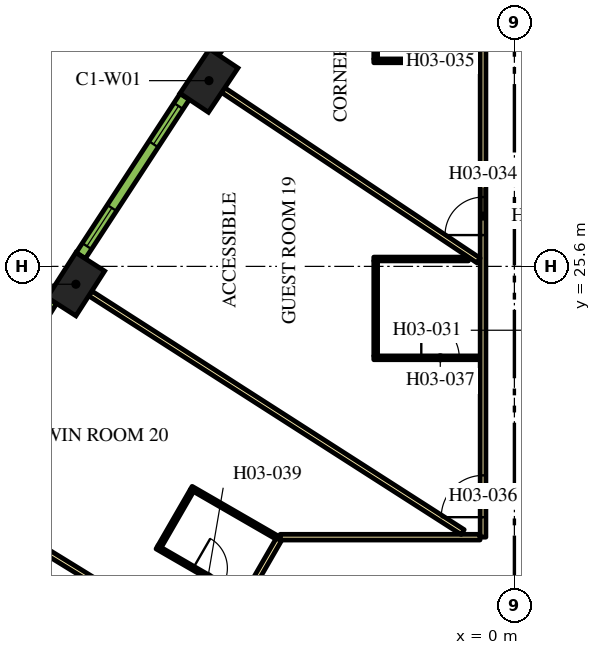
"""IFC4 building model, lengths in metres.
Left out: names, types, materials, properties, quantities, classifications, styles, units other than length and angle.
Written with IfcOpenShell. Run it as: python <this file> out.ifc"""

import sys

from ifc_helpers import new_model, si_unit, direction, frame, frame_2d, origin, origin_2d, place, context, subcontext, project, spatial, rectangle, extrude, element, fill, save


model = new_model("IFC4")
c1 = context("Model", 3, precision=1e-05, world=origin(), true_north=direction((0.0, 1.0)))
c2 = subcontext(c1, "Body", "Model", "MODEL_VIEW")
j1 = project(units=[si_unit("LENGTHUNIT", "METRE"), si_unit("PLANEANGLEUNIT", "RADIAN")], contexts=[c1])
p1 = place(None, origin())
s1 = spatial("IfcSite", under=j1, at=p1, CompositionType="ELEMENT")
p2 = place(p1, origin())
s2 = spatial("IfcBuilding", under=s1, at=p2, CompositionType="ELEMENT")
p3 = place(p2, frame((0.0, 0.0, 54.9)))
s3 = spatial("IfcBuildingStorey", under=s2, at=p3, CompositionType="ELEMENT", Elevation=54.9)
for number, where, z_axis, x_axis in (
    (1, (-8.037, 30.487, 0.0), (0.0, 0.0, 1.0), (-0.555, -0.832, 0.0)),
    (2, (-11.539, 25.131, 0.0), (0.0, 0.0, 1.0), (-0.539, -0.842, 0.0)),
):
    element("IfcColumn", number, at=place(p3, frame(where, z_axis=z_axis, x_axis=x_axis)), inside=s3, PredefinedType="COLUMN", context=c2, shape_type="SweptSolid", body=[
        extrude(rectangle(XDim=1.4, YDim=0.9, at=origin_2d()), origin(), (0.0, 0.0, 1.0), 3.9),
    ])
p4 = place(p3, frame((-0.825, 18.475, 0.0), z_axis=(0.0, 0.0, 1.0), x_axis=(0.0, 1.0, 0.0)))
e3 = element("IfcWall", 3, at=p4, inside=s3, PredefinedType="PARTITIONING", context=c2, shape_type="SweptSolid", body=[
    extrude(rectangle(XDim=16.224, YDim=0.15, at=frame_2d((8.112, 0.0))), origin(), (0.0, 0.0, 1.0), 2.75),
])
p5 = place(p4, frame((7.949, 0.0, 0.0)))
e4 = element("IfcOpeningElement", 4, at=p5, cuts=e3, PredefinedType="OPENING", context=c2, shape_type="SweptSolid", body=[
    extrude(rectangle(XDim=1.0, YDim=2.1, at=frame_2d((0.5, 1.05))), frame((0.0, 0.085, 0.0), z_axis=(0.0, -1.0, 0.0), x_axis=(1.0, 0.0, 0.0)), (0.0, 0.0, 1.0), 0.17),
])
p6 = place(p4, frame((0.526, 0.0, 0.0)))
e5 = element("IfcOpeningElement", 5, at=p6, cuts=e3, PredefinedType="OPENING", context=c2, shape_type="SweptSolid", body=[
    extrude(rectangle(XDim=1.1, YDim=2.1, at=frame_2d((0.55, 1.05))), frame((0.0, 0.085, 0.0), z_axis=(0.0, -1.0, 0.0), x_axis=(1.0, 0.0, 0.0)), (0.0, 0.0, 1.0), 0.17),
])
p7 = place(p3, frame((-6.163, 18.475, 0.0), z_axis=(0.0, 0.0, 1.0), x_axis=(1.0, 0.0, 0.0)))
e6 = element("IfcWall", 6, at=p7, inside=s3, PredefinedType="PARTITIONING", context=c2, shape_type="SweptSolid", body=[
    extrude(rectangle(XDim=5.258, YDim=0.15, at=frame_2d((2.629, 0.0))), origin(), (0.0, 0.0, 1.0), 2.75),
])
p8 = place(p3, frame((-19.081, -3.9, 0.0), z_axis=(0.0, 0.0, 1.0), x_axis=(0.499998313975, 0.866026377209, 0.0)))
e7 = element("IfcWall", 7, at=p8, inside=s3, PredefinedType="PARTITIONING", context=c2, shape_type="SweptSolid", body=[
    extrude(rectangle(XDim=25.766, YDim=0.15, at=frame_2d((12.883, 0.0))), origin(), (0.0, 0.0, 1.0), 2.75),
])
p9 = place(p8, frame((22.445, 0.0, 0.0)))
e8 = element("IfcOpeningElement", 8, at=p9, cuts=e7, PredefinedType="OPENING", context=c2, shape_type="SweptSolid", body=[
    extrude(rectangle(XDim=1.0, YDim=2.1, at=frame_2d((0.5, 1.05))), frame((0.0, 0.085, 0.0), z_axis=(0.0, -1.0, 0.0), x_axis=(1.0, 0.0, 0.0)), (0.0, 0.0, 1.0), 0.17),
])
p10 = place(p8, frame((21.138, 0.0, 0.0)))
e9 = element("IfcOpeningElement", 9, at=p10, cuts=e7, PredefinedType="OPENING", context=c2, shape_type="SweptSolid", body=[
    extrude(rectangle(XDim=1.0, YDim=2.1, at=frame_2d((0.5, 1.05))), frame((0.0, 0.085, 0.0), z_axis=(0.0, -1.0, 0.0), x_axis=(1.0, 0.0, 0.0)), (0.0, 0.0, 1.0), 0.17),
])
p11 = place(p8, frame((14.066, 0.0, 0.0)))
e10 = element("IfcOpeningElement", 10, at=p11, cuts=e7, PredefinedType="OPENING", context=c2, shape_type="SweptSolid", body=[
    extrude(rectangle(XDim=0.9, YDim=2.1, at=frame_2d((0.45, 1.05))), frame((0.0, 0.085, 0.0), z_axis=(0.0, -1.0, 0.0), x_axis=(1.0, 0.0, 0.0)), (0.0, 0.0, 1.0), 0.17),
])
p12 = place(p8, frame((11.693, 0.0, 0.0)))
e11 = element("IfcOpeningElement", 11, at=p12, cuts=e7, PredefinedType="OPENING", context=c2, shape_type="SweptSolid", body=[
    extrude(rectangle(XDim=1.0, YDim=2.1, at=frame_2d((0.5, 1.05))), frame((0.0, 0.085, 0.0), z_axis=(0.0, -1.0, 0.0), x_axis=(1.0, 0.0, 0.0)), (0.0, 0.0, 1.0), 0.17),
])
p13 = place(p3, frame((-14.558, 19.475, 0.0), z_axis=(0.0, 0.0, 1.0), x_axis=(0.851829455142, -0.523819223925, 0.0)))
e12 = element("IfcWall", 12, at=p13, inside=s3, PredefinedType="PARTITIONING", context=c2, shape_type="SweptSolid", body=[
    extrude(rectangle(XDim=7.688, YDim=0.15, at=frame_2d((3.844, 0.0))), origin(), (0.0, 0.0, 1.0), 2.75),
])
p14 = place(p3, frame((-11.16, 24.888, 0.0), z_axis=(0.0, 0.0, 1.0), x_axis=(0.84199813156, -0.539480441211, 0.0)))
e13 = element("IfcWall", 13, at=p14, inside=s3, PredefinedType="PARTITIONING", context=c2, shape_type="SweptSolid", body=[
    extrude(rectangle(XDim=11.638, YDim=0.15, at=frame_2d((5.819, 0.0))), origin(), (0.0, 0.0, 1.0), 2.75),
])
p15 = place(p3, frame((-7.662, 30.238, 0.0), z_axis=(0.0, 0.0, 1.0), x_axis=(0.831882886825, -0.554951225431, 0.0)))
e14 = element("IfcWall", 14, at=p15, inside=s3, PredefinedType="PARTITIONING", context=c2, shape_type="SweptSolid", body=[
    extrude(rectangle(XDim=8.079, YDim=0.15, at=frame_2d((4.04, 0.0))), origin(), (0.0, 0.0, 1.0), 2.75),
])
p16 = place(p3, frame((-3.7, 31.009, 0.0), z_axis=(0.0, 0.0, 1.0), x_axis=(1.0, 0.0, 0.0)))
e15 = element("IfcWall", 15, at=p16, inside=s3, PredefinedType="PARTITIONING", context=c2, shape_type="SweptSolid", body=[
    extrude(rectangle(XDim=2.8, YDim=0.1, at=frame_2d((1.4, 0.0))), origin(), (0.0, 0.0, 1.0), 2.75),
])
p17 = place(p16, frame((1.3, 0.0, 0.0)))
e16 = element("IfcOpeningElement", 16, at=p17, cuts=e15, PredefinedType="OPENING", context=c2, shape_type="SweptSolid", body=[
    extrude(rectangle(XDim=0.9, YDim=2.1, at=frame_2d((0.45, 1.05))), frame((0.0, 0.06, 0.0), z_axis=(0.0, -1.0, 0.0), x_axis=(1.0, 0.0, 0.0)), (0.0, 0.0, 1.0), 0.12),
])
p18 = place(p3, frame((-3.65, 31.059, 0.0), z_axis=(0.0, 0.0, 1.0), x_axis=(0.0, 1.0, 0.0)))
e17 = element("IfcWall", 17, at=p18, inside=s3, PredefinedType="PARTITIONING", context=c2, shape_type="SweptSolid", body=[
    extrude(rectangle(XDim=2.4, YDim=0.1, at=frame_2d((1.2, 0.0))), origin(), (0.0, 0.0, 1.0), 2.75),
])
p19 = place(p3, frame((-3.7, 23.195, 0.0), z_axis=(0.0, 0.0, 1.0), x_axis=(1.0, 0.0, 0.0)))
e18 = element("IfcWall", 18, at=p19, inside=s3, PredefinedType="PARTITIONING", context=c2, shape_type="SweptSolid", body=[
    extrude(rectangle(XDim=2.8, YDim=0.1, at=frame_2d((1.4, 0.0))), origin(), (0.0, 0.0, 1.0), 2.75),
])
p20 = place(p19, frame((1.25, 0.0, 0.0)))
e19 = element("IfcOpeningElement", 19, at=p20, cuts=e18, PredefinedType="OPENING", context=c2, shape_type="SweptSolid", body=[
    extrude(rectangle(XDim=1.0, YDim=2.1, at=frame_2d((0.5, 1.05))), frame((0.0, 0.06, 0.0), z_axis=(0.0, -1.0, 0.0), x_axis=(1.0, 0.0, 0.0)), (0.0, 0.0, 1.0), 0.12),
])
p21 = place(p3, frame((-3.65, 23.245, 0.0), z_axis=(0.0, 0.0, 1.0), x_axis=(0.0, 1.0, 0.0)))
e20 = element("IfcWall", 20, at=p21, inside=s3, PredefinedType="PARTITIONING", context=c2, shape_type="SweptSolid", body=[
    extrude(rectangle(XDim=2.5, YDim=0.1, at=frame_2d((1.25, 0.0))), origin(), (0.0, 0.0, 1.0), 2.75),
])
p22 = place(p3, frame((-1.21, 25.795, 0.0), z_axis=(0.0, 0.0, 1.0), x_axis=(-1.0, 0.0, 0.0)))
e21 = element("IfcWall", 21, at=p22, inside=s3, PredefinedType="PARTITIONING", context=c2, shape_type="SweptSolid", body=[
    extrude(rectangle(XDim=2.49, YDim=0.1, at=frame_2d((1.245, 0.0))), origin(), (0.0, 0.0, 1.0), 2.75),
])
p23 = place(p3, frame((-9.405, 18.21, 0.0), z_axis=(0.0, 0.0, 1.0), x_axis=(0.865997922154, -0.500047596559, 0.0)))
e22 = element("IfcWall", 22, at=p23, inside=s3, PredefinedType="PARTITIONING", context=c2, shape_type="SweptSolid", body=[
    extrude(rectangle(XDim=2.6, YDim=0.1, at=frame_2d((1.3, 0.0))), origin(), (0.0, 0.0, 1.0), 2.75),
])
p24 = place(p23, frame((1.1, 0.0, 0.0)))
e23 = element("IfcOpeningElement", 23, at=p24, cuts=e22, PredefinedType="OPENING", context=c2, shape_type="SweptSolid", body=[
    extrude(rectangle(XDim=0.9, YDim=2.1, at=frame_2d((0.45, 1.05))), frame((0.0, 0.06, 0.0), z_axis=(0.0, -1.0, 0.0), x_axis=(1.0, 0.0, 0.0)), (0.0, 0.0, 1.0), 0.12),
])
p25 = place(p3, frame((-9.336, 18.229, 0.0), z_axis=(0.0, 0.0, 1.0), x_axis=(0.499954529098, 0.86605165483, 0.0)))
e24 = element("IfcWall", 24, at=p25, inside=s3, PredefinedType="PARTITIONING", context=c2, shape_type="SweptSolid", body=[
    extrude(rectangle(XDim=1.7, YDim=0.1, at=frame_2d((0.85, 0.0))), origin(), (0.0, 0.0, 1.0), 2.75),
])
p26 = place(p3, frame((-6.253, 18.469, 0.0), z_axis=(0.0, 0.0, 1.0), x_axis=(-0.866021400173, 0.500006934395, 0.0)))
e25 = element("IfcWall", 25, at=p26, inside=s3, PredefinedType="PARTITIONING", context=c2, shape_type="SweptSolid", body=[
    extrude(rectangle(XDim=2.6, YDim=0.1, at=frame_2d((1.3, 0.0))), origin(), (0.0, 0.0, 1.0), 2.75),
])
p27 = place(p3, frame((-5.078, 35.376, 0.0), z_axis=(0.0, 0.0, 1.0), x_axis=(-0.562610153679, -0.826722332454, 0.0)))
e26 = element("IfcWall", 26, at=p27, inside=s3, PredefinedType="SOLIDWALL", context=c2, shape_type="SweptSolid", body=[
    extrude(rectangle(XDim=5.006, YDim=0.29, at=frame_2d((2.503, 0.0))), origin(), (0.0, 0.0, 1.0), 3.65),
])
p28 = place(p27, frame((0.265, 0.0, 0.9)))
e27 = element("IfcOpeningElement", 27, at=p28, cuts=e26, PredefinedType="OPENING", context=c2, shape_type="SweptSolid", body=[
    extrude(rectangle(XDim=1.2, YDim=2.15, at=frame_2d((0.6, 1.075))), frame((0.0, 0.155, 0.0), z_axis=(0.0, -1.0, 0.0), x_axis=(1.0, 0.0, 0.0)), (0.0, 0.0, 1.0), 0.31),
])
p29 = place(p27, frame((3.495, 0.0, 0.9)))
e28 = element("IfcOpeningElement", 28, at=p29, cuts=e26, PredefinedType="OPENING", context=c2, shape_type="SweptSolid", body=[
    extrude(rectangle(XDim=1.2, YDim=2.15, at=frame_2d((0.6, 1.075))), frame((0.0, 0.155, 0.0), z_axis=(0.0, -1.0, 0.0), x_axis=(1.0, 0.0, 0.0)), (0.0, 0.0, 1.0), 0.31),
])
p30 = place(p3, frame((-8.676, 30.068, 0.0), z_axis=(0.0, 0.0, 1.0), x_axis=(-0.547204617628, -0.836998868845, 0.0)))
e29 = element("IfcWall", 29, at=p30, inside=s3, PredefinedType="SOLIDWALL", context=c2, shape_type="SweptSolid", body=[
    extrude(rectangle(XDim=4.998, YDim=0.29, at=frame_2d((2.499, 0.0))), origin(), (0.0, 0.0, 1.0), 3.65),
])
p31 = place(p30, frame((0.297, 0.0, 0.9)))
e30 = element("IfcOpeningElement", 30, at=p31, cuts=e29, PredefinedType="OPENING", context=c2, shape_type="SweptSolid", body=[
    extrude(rectangle(XDim=1.2, YDim=2.15, at=frame_2d((0.6, 1.075))), frame((0.0, 0.155, 0.0), z_axis=(0.0, -1.0, 0.0), x_axis=(1.0, 0.0, 0.0)), (0.0, 0.0, 1.0), 0.31),
])
p32 = place(p30, frame((3.501, 0.0, 0.9)))
e31 = element("IfcOpeningElement", 31, at=p32, cuts=e29, PredefinedType="OPENING", context=c2, shape_type="SweptSolid", body=[
    extrude(rectangle(XDim=1.2, YDim=2.15, at=frame_2d((0.6, 1.075))), frame((0.0, 0.155, 0.0), z_axis=(0.0, -1.0, 0.0), x_axis=(1.0, 0.0, 0.0)), (0.0, 0.0, 1.0), 0.31),
])
p33 = place(p3, frame((-12.17, 24.699, 0.0), z_axis=(0.0, 0.0, 1.0), x_axis=(-0.531688286542, -0.846940119462, 0.0)))
e32 = element("IfcWall", 32, at=p33, inside=s3, PredefinedType="SOLIDWALL", context=c2, shape_type="SweptSolid", body=[
    extrude(rectangle(XDim=4.998, YDim=0.29, at=frame_2d((2.499, 0.0))), origin(), (0.0, 0.0, 1.0), 3.65),
])
p34 = place(p33, frame((0.297, 0.0, 0.9)))
e33 = element("IfcOpeningElement", 33, at=p34, cuts=e32, PredefinedType="OPENING", context=c2, shape_type="SweptSolid", body=[
    extrude(rectangle(XDim=1.2, YDim=2.15, at=frame_2d((0.6, 1.075))), frame((0.0, 0.155, 0.0), z_axis=(0.0, -1.0, 0.0), x_axis=(1.0, 0.0, 0.0)), (0.0, 0.0, 1.0), 0.31),
])
p35 = place(p33, frame((3.501, 0.0, 0.9)))
e34 = element("IfcOpeningElement", 34, at=p35, cuts=e32, PredefinedType="OPENING", context=c2, shape_type="SweptSolid", body=[
    extrude(rectangle(XDim=1.2, YDim=2.15, at=frame_2d((0.6, 1.075))), frame((0.0, 0.155, 0.0), z_axis=(0.0, -1.0, 0.0), x_axis=(1.0, 0.0, 0.0)), (0.0, 0.0, 1.0), 0.31),
])
p36 = place(p5, origin())
e35 = element("IfcDoor", 35, at=p36, inside=s3, OperationType="SINGLE_SWING_LEFT", PredefinedType="DOOR", context=c2, shape_type="SweptSolid", body=[
    extrude(rectangle(XDim=1.0, YDim=2.1, at=frame_2d((0.5, 1.05))), frame((0.0, 0.025, 0.0), z_axis=(0.0, -1.0, 0.0), x_axis=(1.0, 0.0, 0.0)), (0.0, 0.0, 1.0), 0.05),
])
fill(e4, e35)
p37 = place(p17, origin())
e36 = element("IfcDoor", 36, at=p37, inside=s3, OperationType="SINGLE_SWING_RIGHT", PredefinedType="DOOR", context=c2, shape_type="SweptSolid", body=[
    extrude(rectangle(XDim=0.9, YDim=2.1, at=frame_2d((0.45, 1.05))), frame((0.0, 0.025, 0.0), z_axis=(0.0, -1.0, 0.0), x_axis=(1.0, 0.0, 0.0)), (0.0, 0.0, 1.0), 0.05),
])
fill(e16, e36)
p38 = place(p6, origin())
e37 = element("IfcDoor", 37, at=p38, inside=s3, OperationType="SINGLE_SWING_LEFT", PredefinedType="DOOR", context=c2, shape_type="SweptSolid", body=[
    extrude(rectangle(XDim=1.1, YDim=2.1, at=frame_2d((0.55, 1.05))), frame((0.0, 0.025, 0.0), z_axis=(0.0, -1.0, 0.0), x_axis=(1.0, 0.0, 0.0)), (0.0, 0.0, 1.0), 0.05),
])
fill(e5, e37)
p39 = place(p20, origin())
e38 = element("IfcDoor", 38, at=p39, inside=s3, OperationType="SINGLE_SWING_LEFT", PredefinedType="DOOR", context=c2, shape_type="SweptSolid", body=[
    extrude(rectangle(XDim=1.0, YDim=2.1, at=frame_2d((0.5, 1.05))), frame((0.0, 0.025, 0.0), z_axis=(0.0, -1.0, 0.0), x_axis=(1.0, 0.0, 0.0)), (0.0, 0.0, 1.0), 0.05),
])
fill(e19, e38)
p40 = place(p24, origin())
e39 = element("IfcDoor", 39, at=p40, inside=s3, OperationType="SINGLE_SWING_LEFT", PredefinedType="DOOR", context=c2, shape_type="SweptSolid", body=[
    extrude(rectangle(XDim=0.9, YDim=2.1, at=frame_2d((0.45, 1.05))), frame((0.0, 0.025, 0.0), z_axis=(0.0, -1.0, 0.0), x_axis=(1.0, 0.0, 0.0)), (0.0, 0.0, 1.0), 0.05),
])
fill(e23, e39)
p41 = place(p31, origin())
e40 = element("IfcWindow", 40, at=p41, inside=s3, PartitioningType="DOUBLE_PANEL_VERTICAL", PredefinedType="WINDOW", context=c2, shape_type="SweptSolid", body=[
    extrude(rectangle(XDim=1.2, YDim=2.15, at=frame_2d((0.6, 1.075))), frame((0.0, 0.015, 0.0), z_axis=(0.0, -1.0, 0.0), x_axis=(1.0, 0.0, 0.0)), (0.0, 0.0, 1.0), 0.06),
])
fill(e30, e40)
p42 = place(p32, origin())
e41 = element("IfcWindow", 41, at=p42, inside=s3, PartitioningType="DOUBLE_PANEL_VERTICAL", PredefinedType="WINDOW", context=c2, shape_type="SweptSolid", body=[
    extrude(rectangle(XDim=1.2, YDim=2.15, at=frame_2d((0.6, 1.075))), frame((0.0, 0.015, 0.0), z_axis=(0.0, -1.0, 0.0), x_axis=(1.0, 0.0, 0.0)), (0.0, 0.0, 1.0), 0.06),
])
fill(e31, e41)
save(model, sys.argv[1])
